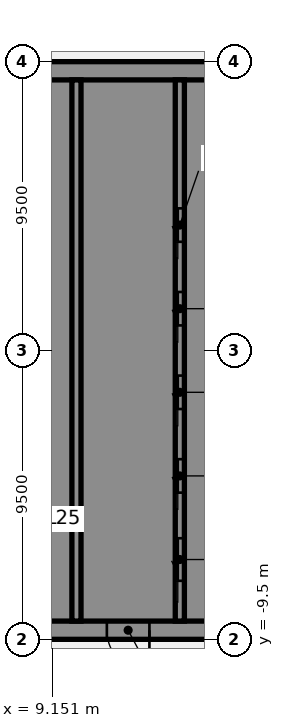
"""IFC4 building model, lengths in metres.
Left out: names, types, materials, properties, quantities, classifications, styles, units other than length and angle.
Written with IfcOpenShell. Run it as: python <this file> out.ifc"""

import sys

from ifc_helpers import new_model, si_unit, direction, frame, frame_2d, origin, place, context, subcontext, project, spatial, polyline, rectangle, outline, extrude, element, fill, save


model = new_model("IFC4")
c1 = context("Model", 3, precision=1e-05, world=origin(), true_north=direction((0.0, 1.0)))
c2 = subcontext(c1, "Body", "Model", "MODEL_VIEW")
j1 = project(units=[si_unit("LENGTHUNIT", "METRE"), si_unit("PLANEANGLEUNIT", "RADIAN")], contexts=[c1])
p1 = place(None, origin())
s1 = spatial("IfcSite", under=j1, at=p1, CompositionType="ELEMENT")
p2 = place(p1, origin())
s2 = spatial("IfcBuilding", under=s1, at=p2, CompositionType="ELEMENT")
p3 = place(p2, frame((0.0, 0.0, 106.0)))
s3 = spatial("IfcBuildingStorey", under=s2, at=p3, CompositionType="ELEMENT", Elevation=106.0)
p4 = place(p3, frame((16.5, -9.2, 0.0), z_axis=(0.0, 0.0, 1.0), x_axis=(-1.0, 0.0, 0.0)))
e1 = element("IfcWall", 1, at=p4, inside=s3, PredefinedType="SHEAR", context=c2, shape_type="SweptSolid", body=[
    extrude(rectangle(XDim=13.0, YDim=0.6, at=frame_2d((6.5, 0.0))), origin(), (0.0, 0.0, 1.0), 3.61),
])
p5 = place(p4, frame((4.15, 0.0, 0.0)))
e2 = element("IfcOpeningElement", 2, at=p5, cuts=e1, PredefinedType="OPENING", context=c2, shape_type="SweptSolid", body=[
    extrude(rectangle(XDim=1.4, YDim=2.1, at=frame_2d((0.7, 1.05))), frame((0.0, 0.31, 0.0), z_axis=(0.0, -1.0, 0.0), x_axis=(1.0, 0.0, 0.0)), (0.0, 0.0, 1.0), 0.62),
])
p6 = place(p4, frame((10.125, 0.0, 0.0)))
e3 = element("IfcOpeningElement", 3, at=p6, cuts=e1, PredefinedType="OPENING", context=c2, shape_type="SweptSolid", body=[
    extrude(rectangle(XDim=1.4, YDim=2.1, at=frame_2d((0.7, 1.05))), frame((0.0, 0.31, 0.0), z_axis=(0.0, -1.0, 0.0), x_axis=(1.0, 0.0, 0.0)), (0.0, 0.0, 1.0), 0.62),
])
p7 = place(p3, origin())
e4 = element("IfcWall", 4, at=p7, inside=s3, PredefinedType="SHEAR", context=c2, shape_type="SweptSolid", body=[
    extrude(outline(polyline([(13.5, -8.9), (15.9, -8.9), (16.5, -8.9), (16.5, 8.9), (15.9, 8.9), (13.5, 8.9), (13.5, 8.125), (15.9, 8.125), (15.9, 5.625), (13.5, 5.625), (13.5, 5.375), (15.9, 5.375), (15.9, 2.875), (13.5, 2.875), (13.5, 2.625), (15.9, 2.625), (15.9, 0.125), (13.5, 0.125), (13.5, -0.125), (15.9, -0.125), (15.9, -2.625), (13.5, -2.625), (13.5, -2.875), (15.9, -2.875), (15.9, -5.375), (13.5, -5.375), (13.5, -5.625), (15.9, -5.625), (15.9, -8.125), (13.5, -8.125), (13.5, -8.9)])), origin(), (0.0, 0.0, 1.0), 3.61),
])
p8 = place(p3, frame((16.5, 9.2, 0.0), z_axis=(0.0, 0.0, 1.0), x_axis=(-1.0, 0.0, 0.0)))
e5 = element("IfcWall", 5, at=p8, inside=s3, PredefinedType="SHEAR", context=c2, shape_type="SweptSolid", body=[
    extrude(rectangle(XDim=13.0, YDim=0.6, at=frame_2d((6.5, 0.0))), origin(), (0.0, 0.0, 1.0), 3.61),
])
p9 = place(p3, origin())
e6 = element("IfcWall", 6, at=p9, inside=s3, PredefinedType="SHEAR", context=c2, shape_type="SweptSolid", body=[
    extrude(outline(polyline([(9.8, -5.375), (7.5, -5.375), (7.5, -2.875), (9.8, -2.875), (9.8, -2.625), (7.5, -2.625), (7.5, -0.125), (9.8, -0.125), (9.8, 0.125), (7.5, 0.125), (7.5, 2.625), (9.8, 2.625), (9.8, 2.875), (7.5, 2.875), (7.5, 5.375), (9.8, 5.375), (9.8, 5.625), (7.5, 5.625), (7.5, 8.125), (9.8, 8.125), (9.8, 8.9), (7.5, 8.9), (7.2, 8.9), (7.2, -5.625), (7.5, -5.625), (9.8, -5.625), (9.8, -5.375)])), origin(), (0.0, 0.0, 1.0), 3.61),
])
p10 = place(p3, origin())
e7 = element("IfcWall", 7, at=p10, inside=s3, PredefinedType="SHEAR", context=c2, shape_type="SweptSolid", body=[
    extrude(outline(polyline([(7.5, -8.125), (7.5, -8.9), (9.8, -8.9), (9.8, -8.125), (9.8, -5.625), (9.55, -5.625), (9.55, -8.125), (7.5, -8.125)])), origin(), (0.0, 0.0, 1.0), 3.61),
])
p11 = place(p3, frame((13.35, -8.9, 0.0), z_axis=(0.0, 0.0, 1.0), x_axis=(0.0, 1.0, 0.0)))
e8 = element("IfcWall", 8, at=p11, inside=s3, PredefinedType="SHEAR", context=c2, shape_type="SweptSolid", body=[
    extrude(rectangle(XDim=17.8, YDim=0.3, at=frame_2d((8.9, 0.0))), origin(), (0.0, 0.0, 1.0), 3.61),
])
p12 = place(p11, frame((1.325, 0.0, 0.0)))
e9 = element("IfcOpeningElement", 9, at=p12, cuts=e8, PredefinedType="OPENING", context=c2, shape_type="SweptSolid", body=[
    extrude(rectangle(XDim=1.4, YDim=2.1, at=frame_2d((0.7, 1.05))), frame((0.0, 0.16, 0.0), z_axis=(0.0, -1.0, 0.0), x_axis=(1.0, 0.0, 0.0)), (0.0, 0.0, 1.0), 0.32),
])
p13 = place(p11, frame((4.225, 0.0, 0.0)))
e10 = element("IfcOpeningElement", 10, at=p13, cuts=e8, PredefinedType="OPENING", context=c2, shape_type="SweptSolid", body=[
    extrude(rectangle(XDim=1.1, YDim=2.1, at=frame_2d((0.55, 1.05))), frame((0.0, 0.16, 0.0), z_axis=(0.0, -1.0, 0.0), x_axis=(1.0, 0.0, 0.0)), (0.0, 0.0, 1.0), 0.32),
])
p14 = place(p11, frame((6.975, 0.0, 0.0)))
e11 = element("IfcOpeningElement", 11, at=p14, cuts=e8, PredefinedType="OPENING", context=c2, shape_type="SweptSolid", body=[
    extrude(rectangle(XDim=1.1, YDim=2.1, at=frame_2d((0.55, 1.05))), frame((0.0, 0.16, 0.0), z_axis=(0.0, -1.0, 0.0), x_axis=(1.0, 0.0, 0.0)), (0.0, 0.0, 1.0), 0.32),
])
p15 = place(p11, frame((9.725, 0.0, 0.0)))
e12 = element("IfcOpeningElement", 12, at=p15, cuts=e8, PredefinedType="OPENING", context=c2, shape_type="SweptSolid", body=[
    extrude(rectangle(XDim=1.1, YDim=2.1, at=frame_2d((0.55, 1.05))), frame((0.0, 0.16, 0.0), z_axis=(0.0, -1.0, 0.0), x_axis=(1.0, 0.0, 0.0)), (0.0, 0.0, 1.0), 0.32),
])
p16 = place(p11, frame((12.475, 0.0, 0.0)))
e13 = element("IfcOpeningElement", 13, at=p16, cuts=e8, PredefinedType="OPENING", context=c2, shape_type="SweptSolid", body=[
    extrude(rectangle(XDim=1.1, YDim=2.1, at=frame_2d((0.55, 1.05))), frame((0.0, 0.16, 0.0), z_axis=(0.0, -1.0, 0.0), x_axis=(1.0, 0.0, 0.0)), (0.0, 0.0, 1.0), 0.32),
])
p17 = place(p3, frame((9.95, -8.9, 0.0), z_axis=(0.0, 0.0, 1.0), x_axis=(0.0, 1.0, 0.0)))
e14 = element("IfcWall", 14, at=p17, inside=s3, PredefinedType="SHEAR", context=c2, shape_type="SweptSolid", body=[
    extrude(rectangle(XDim=17.8, YDim=0.3, at=frame_2d((8.9, 0.0))), origin(), (0.0, 0.0, 1.0), 3.61),
])
p18 = place(p5, origin())
e15 = element("IfcDoor", 15, at=p18, inside=s3, OperationType="SINGLE_SWING_LEFT", PredefinedType="DOOR", context=c2, shape_type="SweptSolid", body=[
    extrude(rectangle(XDim=1.4, YDim=2.1, at=frame_2d((0.7, 1.05))), frame((0.0, 0.025, 0.0), z_axis=(0.0, -1.0, 0.0), x_axis=(1.0, 0.0, 0.0)), (0.0, 0.0, 1.0), 0.05),
])
fill(e2, e15)
p19 = place(p12, origin())
e16 = element("IfcDoor", 16, at=p19, inside=s3, OperationType="SLIDING_TO_LEFT", PredefinedType="DOOR", context=c2, shape_type="SweptSolid", body=[
    extrude(rectangle(XDim=1.4, YDim=2.1, at=frame_2d((0.7, 1.05))), frame((0.0, 0.025, 0.0), z_axis=(0.0, -1.0, 0.0), x_axis=(1.0, 0.0, 0.0)), (0.0, 0.0, 1.0), 0.05),
])
fill(e9, e16)
p20 = place(p13, origin())
e17 = element("IfcDoor", 17, at=p20, inside=s3, OperationType="SLIDING_TO_LEFT", PredefinedType="DOOR", context=c2, shape_type="SweptSolid", body=[
    extrude(rectangle(XDim=1.1, YDim=2.1, at=frame_2d((0.55, 1.05))), frame((0.0, 0.025, 0.0), z_axis=(0.0, -1.0, 0.0), x_axis=(1.0, 0.0, 0.0)), (0.0, 0.0, 1.0), 0.05),
])
fill(e10, e17)
p21 = place(p14, origin())
e18 = element("IfcDoor", 18, at=p21, inside=s3, OperationType="SLIDING_TO_LEFT", PredefinedType="DOOR", context=c2, shape_type="SweptSolid", body=[
    extrude(rectangle(XDim=1.1, YDim=2.1, at=frame_2d((0.55, 1.05))), frame((0.0, 0.025, 0.0), z_axis=(0.0, -1.0, 0.0), x_axis=(1.0, 0.0, 0.0)), (0.0, 0.0, 1.0), 0.05),
])
fill(e11, e18)
p22 = place(p15, origin())
e19 = element("IfcDoor", 19, at=p22, inside=s3, OperationType="SLIDING_TO_LEFT", PredefinedType="DOOR", context=c2, shape_type="SweptSolid", body=[
    extrude(rectangle(XDim=1.1, YDim=2.1, at=frame_2d((0.55, 1.05))), frame((0.0, 0.025, 0.0), z_axis=(0.0, -1.0, 0.0), x_axis=(1.0, 0.0, 0.0)), (0.0, 0.0, 1.0), 0.05),
])
fill(e12, e19)
p23 = place(p16, origin())
e20 = element("IfcDoor", 20, at=p23, inside=s3, OperationType="SLIDING_TO_LEFT", PredefinedType="DOOR", context=c2, shape_type="SweptSolid", body=[
    extrude(rectangle(XDim=1.1, YDim=2.1, at=frame_2d((0.55, 1.05))), frame((0.0, 0.025, 0.0), z_axis=(0.0, -1.0, 0.0), x_axis=(1.0, 0.0, 0.0)), (0.0, 0.0, 1.0), 0.05),
])
fill(e13, e20)
save(model, sys.argv[1])
